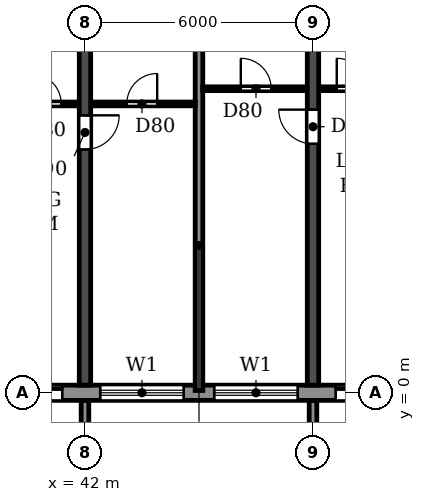
"""IFC4 building model, lengths in metres.
Left out: names, types, materials, properties, quantities, classifications, styles, units other than length and angle.
Written with IfcOpenShell. Run it as: python <this file> out.ifc"""

import sys

from ifc_helpers import new_model, si_unit, direction, frame, frame_2d, origin, place, context, subcontext, project, spatial, polyline, rectangle, outline, extrude, source, transform, mapped, element, fill, save


model = new_model("IFC4")
c1 = context("Model", 3, precision=1e-05, world=origin(), true_north=direction((0.0, 1.0)))
c2 = subcontext(c1, "Body", "Model", "MODEL_VIEW")
j1 = project(units=[si_unit("LENGTHUNIT", "METRE"), si_unit("PLANEANGLEUNIT", "RADIAN")], contexts=[c1])
p1 = place(None, origin())
s1 = spatial("IfcSite", under=j1, at=p1, CompositionType="ELEMENT")
p2 = place(p1, origin())
s2 = spatial("IfcBuilding", under=s1, at=p2, CompositionType="ELEMENT")
p3 = place(p2, frame((0.0, 0.0, 155.4)))
s3 = spatial("IfcBuildingStorey", under=s2, at=p3, CompositionType="ELEMENT", Elevation=155.4)
p4 = place(p3, frame((42.0, 0.2, 0.0), z_axis=(0.0, 0.0, 1.0), x_axis=(0.0, 1.0, 0.0)))
e1 = element("IfcWall", 1, at=p4, inside=s3, PredefinedType="SHEAR", context=c2, shape_type="SweptSolid", body=[
    extrude(rectangle(XDim=11.675, YDim=0.3, at=frame_2d((5.837, 0.0))), origin(), (0.0, 0.0, 1.0), 3.0),
])
p5 = place(p4, frame((6.2, 0.0, 0.0)))
e2 = element("IfcOpeningElement", 2, at=p5, cuts=e1, PredefinedType="OPENING", context=c2, shape_type="SweptSolid", body=[
    extrude(rectangle(XDim=0.9, YDim=2.1, at=frame_2d((0.45, 1.05))), frame((0.0, 0.16, 0.0), z_axis=(0.0, -1.0, 0.0), x_axis=(1.0, 0.0, 0.0)), (0.0, 0.0, 1.0), 0.32),
])
p6 = place(p3, frame((48.0, 0.2, 0.0), z_axis=(0.0, 0.0, 1.0), x_axis=(0.0, 1.0, 0.0)))
e3 = element("IfcWall", 3, at=p6, inside=s3, PredefinedType="SHEAR", context=c2, shape_type="SweptSolid", body=[
    extrude(rectangle(XDim=11.675, YDim=0.3, at=frame_2d((5.837, 0.0))), origin(), (0.0, 0.0, 1.0), 3.0),
])
p7 = place(p6, frame((6.35, 0.0, 0.0)))
e4 = element("IfcOpeningElement", 4, at=p7, cuts=e3, PredefinedType="OPENING", context=c2, shape_type="SweptSolid", body=[
    extrude(rectangle(XDim=0.9, YDim=2.1, at=frame_2d((0.45, 1.05))), frame((0.0, 0.16, 0.0), z_axis=(0.0, -1.0, 0.0), x_axis=(1.0, 0.0, 0.0)), (0.0, 0.0, 1.0), 0.32),
])
p8 = place(p3, frame((16.683, 0.0, 0.0), z_axis=(0.0, 0.0, 1.0), x_axis=(1.0, 0.0, 0.0)))
e5 = element("IfcWall", 5, at=p8, inside=s3, PredefinedType="STANDARD", context=c2, shape_type="SweptSolid", body=[
    extrude(rectangle(XDim=68.634, YDim=0.4, at=frame_2d((34.317, 0.0))), origin(), (0.0, 0.0, 1.0), 3.0),
])
p9 = place(p8, frame((1.717, 0.0, 0.9)))
e6 = element("IfcOpeningElement", 6, at=p9, cuts=e5, PredefinedType="OPENING", context=c2, shape_type="SweptSolid", body=[
    extrude(rectangle(XDim=2.2, YDim=1.5, at=frame_2d((1.1, 0.75))), frame((0.0, 0.21, 0.0), z_axis=(0.0, -1.0, 0.0), x_axis=(1.0, 0.0, 0.0)), (0.0, 0.0, 1.0), 0.42),
])
p10 = place(p8, frame((4.717, 0.0, 0.9)))
e7 = element("IfcOpeningElement", 7, at=p10, cuts=e5, PredefinedType="OPENING", context=c2, shape_type="SweptSolid", body=[
    extrude(rectangle(XDim=2.2, YDim=1.5, at=frame_2d((1.1, 0.75))), frame((0.0, 0.21, 0.0), z_axis=(0.0, -1.0, 0.0), x_axis=(1.0, 0.0, 0.0)), (0.0, 0.0, 1.0), 0.42),
])
p11 = place(p8, frame((7.917, 0.0, 0.0)))
e8 = element("IfcOpeningElement", 8, at=p11, cuts=e5, PredefinedType="OPENING", context=c2, shape_type="SweptSolid", body=[
    extrude(rectangle(XDim=1.8, YDim=2.4, at=frame_2d((0.9, 1.2))), frame((0.0, 0.21, 0.0), z_axis=(0.0, -1.0, 0.0), x_axis=(1.0, 0.0, 0.0)), (0.0, 0.0, 1.0), 0.42),
])
p12 = place(p8, frame((10.717, 0.0, 0.9)))
e9 = element("IfcOpeningElement", 9, at=p12, cuts=e5, PredefinedType="OPENING", context=c2, shape_type="SweptSolid", body=[
    extrude(rectangle(XDim=2.2, YDim=1.5, at=frame_2d((1.1, 0.75))), frame((0.0, 0.21, 0.0), z_axis=(0.0, -1.0, 0.0), x_axis=(1.0, 0.0, 0.0)), (0.0, 0.0, 1.0), 0.42),
])
p13 = place(p8, frame((13.717, 0.0, 0.9)))
e10 = element("IfcOpeningElement", 10, at=p13, cuts=e5, PredefinedType="OPENING", context=c2, shape_type="SweptSolid", body=[
    extrude(rectangle(XDim=2.2, YDim=1.5, at=frame_2d((1.1, 0.75))), frame((0.0, 0.21, 0.0), z_axis=(0.0, -1.0, 0.0), x_axis=(1.0, 0.0, 0.0)), (0.0, 0.0, 1.0), 0.42),
])
p14 = place(p8, frame((16.717, 0.0, 0.9)))
e11 = element("IfcOpeningElement", 11, at=p14, cuts=e5, PredefinedType="OPENING", context=c2, shape_type="SweptSolid", body=[
    extrude(rectangle(XDim=2.2, YDim=1.5, at=frame_2d((1.1, 0.75))), frame((0.0, 0.21, 0.0), z_axis=(0.0, -1.0, 0.0), x_axis=(1.0, 0.0, 0.0)), (0.0, 0.0, 1.0), 0.42),
])
p15 = place(p8, frame((19.717, 0.0, 0.9)))
e12 = element("IfcOpeningElement", 12, at=p15, cuts=e5, PredefinedType="OPENING", context=c2, shape_type="SweptSolid", body=[
    extrude(rectangle(XDim=2.2, YDim=1.5, at=frame_2d((1.1, 0.75))), frame((0.0, 0.21, 0.0), z_axis=(0.0, -1.0, 0.0), x_axis=(1.0, 0.0, 0.0)), (0.0, 0.0, 1.0), 0.42),
])
p16 = place(p8, frame((22.917, 0.0, 0.0)))
e13 = element("IfcOpeningElement", 13, at=p16, cuts=e5, PredefinedType="OPENING", context=c2, shape_type="SweptSolid", body=[
    extrude(rectangle(XDim=1.8, YDim=2.4, at=frame_2d((0.9, 1.2))), frame((0.0, 0.21, 0.0), z_axis=(0.0, -1.0, 0.0), x_axis=(1.0, 0.0, 0.0)), (0.0, 0.0, 1.0), 0.42),
])
p17 = place(p8, frame((25.717, 0.0, 0.9)))
e14 = element("IfcOpeningElement", 14, at=p17, cuts=e5, PredefinedType="OPENING", context=c2, shape_type="SweptSolid", body=[
    extrude(rectangle(XDim=2.2, YDim=1.5, at=frame_2d((1.1, 0.75))), frame((0.0, 0.21, 0.0), z_axis=(0.0, -1.0, 0.0), x_axis=(1.0, 0.0, 0.0)), (0.0, 0.0, 1.0), 0.42),
])
p18 = place(p8, frame((28.717, 0.0, 0.9)))
e15 = element("IfcOpeningElement", 15, at=p18, cuts=e5, PredefinedType="OPENING", context=c2, shape_type="SweptSolid", body=[
    extrude(rectangle(XDim=2.2, YDim=1.5, at=frame_2d((1.1, 0.75))), frame((0.0, 0.21, 0.0), z_axis=(0.0, -1.0, 0.0), x_axis=(1.0, 0.0, 0.0)), (0.0, 0.0, 1.0), 0.42),
])
p19 = place(p8, frame((31.917, 0.0, 0.0)))
e16 = element("IfcOpeningElement", 16, at=p19, cuts=e5, PredefinedType="OPENING", context=c2, shape_type="SweptSolid", body=[
    extrude(rectangle(XDim=1.8, YDim=2.4, at=frame_2d((0.9, 1.2))), frame((0.0, 0.21, 0.0), z_axis=(0.0, -1.0, 0.0), x_axis=(1.0, 0.0, 0.0)), (0.0, 0.0, 1.0), 0.42),
])
p20 = place(p8, frame((34.717, 0.0, 0.9)))
e17 = element("IfcOpeningElement", 17, at=p20, cuts=e5, PredefinedType="OPENING", context=c2, shape_type="SweptSolid", body=[
    extrude(rectangle(XDim=2.2, YDim=1.5, at=frame_2d((1.1, 0.75))), frame((0.0, 0.21, 0.0), z_axis=(0.0, -1.0, 0.0), x_axis=(1.0, 0.0, 0.0)), (0.0, 0.0, 1.0), 0.42),
])
p21 = place(p8, frame((37.717, 0.0, 0.9)))
e18 = element("IfcOpeningElement", 18, at=p21, cuts=e5, PredefinedType="OPENING", context=c2, shape_type="SweptSolid", body=[
    extrude(rectangle(XDim=2.2, YDim=1.5, at=frame_2d((1.1, 0.75))), frame((0.0, 0.21, 0.0), z_axis=(0.0, -1.0, 0.0), x_axis=(1.0, 0.0, 0.0)), (0.0, 0.0, 1.0), 0.42),
])
p22 = place(p8, frame((40.717, 0.0, 0.9)))
e19 = element("IfcOpeningElement", 19, at=p22, cuts=e5, PredefinedType="OPENING", context=c2, shape_type="SweptSolid", body=[
    extrude(rectangle(XDim=2.2, YDim=1.5, at=frame_2d((1.1, 0.75))), frame((0.0, 0.21, 0.0), z_axis=(0.0, -1.0, 0.0), x_axis=(1.0, 0.0, 0.0)), (0.0, 0.0, 1.0), 0.42),
])
p23 = place(p8, frame((43.717, 0.0, 0.9)))
e20 = element("IfcOpeningElement", 20, at=p23, cuts=e5, PredefinedType="OPENING", context=c2, shape_type="SweptSolid", body=[
    extrude(rectangle(XDim=2.2, YDim=1.5, at=frame_2d((1.1, 0.75))), frame((0.0, 0.21, 0.0), z_axis=(0.0, -1.0, 0.0), x_axis=(1.0, 0.0, 0.0)), (0.0, 0.0, 1.0), 0.42),
])
p24 = place(p8, frame((46.917, 0.0, 0.0)))
e21 = element("IfcOpeningElement", 21, at=p24, cuts=e5, PredefinedType="OPENING", context=c2, shape_type="SweptSolid", body=[
    extrude(rectangle(XDim=1.8, YDim=2.4, at=frame_2d((0.9, 1.2))), frame((0.0, 0.21, 0.0), z_axis=(0.0, -1.0, 0.0), x_axis=(1.0, 0.0, 0.0)), (0.0, 0.0, 1.0), 0.42),
])
p25 = place(p8, frame((49.717, 0.0, 0.9)))
e22 = element("IfcOpeningElement", 22, at=p25, cuts=e5, PredefinedType="OPENING", context=c2, shape_type="SweptSolid", body=[
    extrude(rectangle(XDim=2.2, YDim=1.5, at=frame_2d((1.1, 0.75))), frame((0.0, 0.21, 0.0), z_axis=(0.0, -1.0, 0.0), x_axis=(1.0, 0.0, 0.0)), (0.0, 0.0, 1.0), 0.42),
])
p26 = place(p8, frame((52.717, 0.0, 0.9)))
e23 = element("IfcOpeningElement", 23, at=p26, cuts=e5, PredefinedType="OPENING", context=c2, shape_type="SweptSolid", body=[
    extrude(rectangle(XDim=2.2, YDim=1.5, at=frame_2d((1.1, 0.75))), frame((0.0, 0.21, 0.0), z_axis=(0.0, -1.0, 0.0), x_axis=(1.0, 0.0, 0.0)), (0.0, 0.0, 1.0), 0.42),
])
p27 = place(p8, frame((55.717, 0.0, 0.9)))
e24 = element("IfcOpeningElement", 24, at=p27, cuts=e5, PredefinedType="OPENING", context=c2, shape_type="SweptSolid", body=[
    extrude(rectangle(XDim=2.2, YDim=1.5, at=frame_2d((1.1, 0.75))), frame((0.0, 0.21, 0.0), z_axis=(0.0, -1.0, 0.0), x_axis=(1.0, 0.0, 0.0)), (0.0, 0.0, 1.0), 0.42),
])
p28 = place(p8, frame((58.917, 0.0, 0.0)))
e25 = element("IfcOpeningElement", 25, at=p28, cuts=e5, PredefinedType="OPENING", context=c2, shape_type="SweptSolid", body=[
    extrude(rectangle(XDim=1.8, YDim=2.4, at=frame_2d((0.9, 1.2))), frame((0.0, 0.21, 0.0), z_axis=(0.0, -1.0, 0.0), x_axis=(1.0, 0.0, 0.0)), (0.0, 0.0, 1.0), 0.42),
])
p29 = place(p8, frame((61.717, 0.0, 0.9)))
e26 = element("IfcOpeningElement", 26, at=p29, cuts=e5, PredefinedType="OPENING", context=c2, shape_type="SweptSolid", body=[
    extrude(rectangle(XDim=2.2, YDim=1.5, at=frame_2d((1.1, 0.75))), frame((0.0, 0.21, 0.0), z_axis=(0.0, -1.0, 0.0), x_axis=(1.0, 0.0, 0.0)), (0.0, 0.0, 1.0), 0.42),
])
p30 = place(p8, frame((64.717, 0.0, 0.9)))
e27 = element("IfcOpeningElement", 27, at=p30, cuts=e5, PredefinedType="OPENING", context=c2, shape_type="SweptSolid", body=[
    extrude(rectangle(XDim=2.2, YDim=1.5, at=frame_2d((1.1, 0.75))), frame((0.0, 0.21, 0.0), z_axis=(0.0, -1.0, 0.0), x_axis=(1.0, 0.0, 0.0)), (0.0, 0.0, 1.0), 0.42),
])
m1 = source(origin(), c2, "Body", "SweptSolid", [
    extrude(outline(polyline([(0.0, 0.0), (0.2, 0.0), (0.2, 1.65), (0.0, 1.65), (0.0, 0.0)])), origin(), (0.0, 0.0, 1.0), 3.1),
])
for number, where in (
    (28, (41.9, -1.85, 0.0)),
    (29, (47.9, -1.85, 0.0)),
):
    element("IfcWall", number, at=place(p3, frame(where)), inside=s3, PredefinedType="STANDARD", context=c2, shape_type="MappedRepresentation", body=[
        mapped(m1, transform((0.0, 0.0, 0.0))),
    ])
p31 = place(p3, frame((45.0, 0.06, 0.0), z_axis=(0.0, 0.0, 1.0), x_axis=(0.0, 1.0, 0.0)))
e30 = element("IfcWall", 30, at=p31, inside=s3, PredefinedType="PARTITIONING", context=c2, shape_type="SweptSolid", body=[
    extrude(rectangle(XDim=11.805, YDim=0.2, at=frame_2d((5.902, 0.0))), origin(), (0.0, 0.0, 1.0), 3.0),
])
p32 = place(p3, frame((39.9, 7.6, 0.0), z_axis=(0.0, 0.0, 1.0), x_axis=(1.0, 0.0, 0.0)))
e31 = element("IfcWall", 31, at=p32, inside=s3, PredefinedType="PARTITIONING", context=c2, shape_type="SweptSolid", body=[
    extrude(rectangle(XDim=1.94, YDim=0.1, at=frame_2d((0.97, 0.0))), origin(), (0.0, 0.0, 1.0), 3.0),
])
p33 = place(p32, frame((0.675, 0.0, 0.0)))
e32 = element("IfcOpeningElement", 32, at=p33, cuts=e31, PredefinedType="OPENING", context=c2, shape_type="SweptSolid", body=[
    extrude(rectangle(XDim=0.8, YDim=2.1, at=frame_2d((0.4, 1.05))), frame((0.0, 0.06, 0.0), z_axis=(0.0, -1.0, 0.0), x_axis=(1.0, 0.0, 0.0)), (0.0, 0.0, 1.0), 0.12),
])
p34 = place(p3, frame((42.16, 7.6, 0.0), z_axis=(0.0, 0.0, 1.0), x_axis=(1.0, 0.0, 0.0)))
e33 = element("IfcWall", 33, at=p34, inside=s3, PredefinedType="PARTITIONING", context=c2, shape_type="SweptSolid", body=[
    extrude(rectangle(XDim=2.74, YDim=0.1, at=frame_2d((1.37, 0.0))), origin(), (0.0, 0.0, 1.0), 3.0),
])
p35 = place(p34, frame((0.94, 0.0, 0.0)))
e34 = element("IfcOpeningElement", 34, at=p35, cuts=e33, PredefinedType="OPENING", context=c2, shape_type="SweptSolid", body=[
    extrude(rectangle(XDim=0.8, YDim=2.1, at=frame_2d((0.4, 1.05))), frame((0.0, 0.06, 0.0), z_axis=(0.0, -1.0, 0.0), x_axis=(1.0, 0.0, 0.0)), (0.0, 0.0, 1.0), 0.12),
])
p36 = place(p3, frame((45.1, 8.0, 0.0), z_axis=(0.0, 0.0, 1.0), x_axis=(1.0, 0.0, 0.0)))
e35 = element("IfcWall", 35, at=p36, inside=s3, PredefinedType="PARTITIONING", context=c2, shape_type="SweptSolid", body=[
    extrude(rectangle(XDim=2.74, YDim=0.1, at=frame_2d((1.37, 0.0))), origin(), (0.0, 0.0, 1.0), 3.0),
])
p37 = place(p36, frame((1.0, 0.0, 0.0)))
e36 = element("IfcOpeningElement", 36, at=p37, cuts=e35, PredefinedType="OPENING", context=c2, shape_type="SweptSolid", body=[
    extrude(rectangle(XDim=0.8, YDim=2.1, at=frame_2d((0.4, 1.05))), frame((0.0, 0.06, 0.0), z_axis=(0.0, -1.0, 0.0), x_axis=(1.0, 0.0, 0.0)), (0.0, 0.0, 1.0), 0.12),
])
p38 = place(p3, frame((48.16, 8.0, 0.0), z_axis=(0.0, 0.0, 1.0), x_axis=(1.0, 0.0, 0.0)))
e37 = element("IfcWall", 37, at=p38, inside=s3, PredefinedType="PARTITIONING", context=c2, shape_type="SweptSolid", body=[
    extrude(rectangle(XDim=1.94, YDim=0.1, at=frame_2d((0.97, 0.0))), origin(), (0.0, 0.0, 1.0), 3.0),
])
p39 = place(p38, frame((0.465, 0.0, 0.0)))
e38 = element("IfcOpeningElement", 38, at=p39, cuts=e37, PredefinedType="OPENING", context=c2, shape_type="SweptSolid", body=[
    extrude(rectangle(XDim=0.8, YDim=2.1, at=frame_2d((0.4, 1.05))), frame((0.0, 0.06, 0.0), z_axis=(0.0, -1.0, 0.0), x_axis=(1.0, 0.0, 0.0)), (0.0, 0.0, 1.0), 0.12),
])
p40 = place(p16, origin())
e39 = element("IfcDoor", 39, at=p40, inside=s3, OperationType="DOUBLE_DOOR_SLIDING", PredefinedType="DOOR", context=c2, shape_type="SweptSolid", body=[
    extrude(rectangle(XDim=1.8, YDim=2.4, at=frame_2d((0.9, 1.2))), frame((0.0, 0.025, 0.0), z_axis=(0.0, -1.0, 0.0), x_axis=(1.0, 0.0, 0.0)), (0.0, 0.0, 1.0), 0.05),
])
fill(e13, e39)
p41 = place(p17, origin())
e40 = element("IfcWindow", 40, at=p41, inside=s3, PartitioningType="DOUBLE_PANEL_HORIZONTAL", PredefinedType="WINDOW", context=c2, shape_type="SweptSolid", body=[
    extrude(rectangle(XDim=2.2, YDim=1.5, at=frame_2d((1.1, 0.75))), frame((0.0, 0.03, 0.0), z_axis=(0.0, -1.0, 0.0), x_axis=(1.0, 0.0, 0.0)), (0.0, 0.0, 1.0), 0.06),
])
fill(e14, e40)
p42 = place(p18, origin())
e41 = element("IfcWindow", 41, at=p42, inside=s3, PartitioningType="DOUBLE_PANEL_HORIZONTAL", PredefinedType="WINDOW", context=c2, shape_type="SweptSolid", body=[
    extrude(rectangle(XDim=2.2, YDim=1.5, at=frame_2d((1.1, 0.75))), frame((0.0, 0.03, 0.0), z_axis=(0.0, -1.0, 0.0), x_axis=(1.0, 0.0, 0.0)), (0.0, 0.0, 1.0), 0.06),
])
fill(e15, e41)
p43 = place(p19, origin())
e42 = element("IfcDoor", 42, at=p43, inside=s3, OperationType="DOUBLE_DOOR_SLIDING", PredefinedType="DOOR", context=c2, shape_type="SweptSolid", body=[
    extrude(rectangle(XDim=1.8, YDim=2.4, at=frame_2d((0.9, 1.2))), frame((0.0, 0.025, 0.0), z_axis=(0.0, -1.0, 0.0), x_axis=(1.0, 0.0, 0.0)), (0.0, 0.0, 1.0), 0.05),
])
fill(e16, e42)
p44 = place(p35, origin())
e43 = element("IfcDoor", 43, at=p44, inside=s3, OperationType="SINGLE_SWING_RIGHT", PredefinedType="DOOR", context=c2, shape_type="SweptSolid", body=[
    extrude(rectangle(XDim=0.8, YDim=2.1, at=frame_2d((0.4, 1.05))), frame((0.0, 0.025, 0.0), z_axis=(0.0, -1.0, 0.0), x_axis=(1.0, 0.0, 0.0)), (0.0, 0.0, 1.0), 0.05),
])
fill(e34, e43)
p45 = place(p33, origin())
e44 = element("IfcDoor", 44, at=p45, inside=s3, OperationType="SINGLE_SWING_LEFT", PredefinedType="DOOR", context=c2, shape_type="SweptSolid", body=[
    extrude(rectangle(XDim=0.8, YDim=2.1, at=frame_2d((0.4, 1.05))), frame((0.0, 0.025, 0.0), z_axis=(0.0, -1.0, 0.0), x_axis=(1.0, 0.0, 0.0)), (0.0, 0.0, 1.0), 0.05),
])
fill(e32, e44)
p46 = place(p5, frame((0.9, 0.0, 0.0), z_axis=(0.0, 0.0, 1.0), x_axis=(-1.0, 0.0, 0.0)))
e45 = element("IfcDoor", 45, at=p46, inside=s3, OperationType="SINGLE_SWING_LEFT", PredefinedType="DOOR", context=c2, shape_type="SweptSolid", body=[
    extrude(rectangle(XDim=0.9, YDim=2.1, at=frame_2d((0.45, 1.05))), frame((0.0, 0.025, 0.0), z_axis=(0.0, -1.0, 0.0), x_axis=(1.0, 0.0, 0.0)), (0.0, 0.0, 1.0), 0.05),
])
fill(e2, e45)
p47 = place(p37, origin())
e46 = element("IfcDoor", 46, at=p47, inside=s3, OperationType="SINGLE_SWING_LEFT", PredefinedType="DOOR", context=c2, shape_type="SweptSolid", body=[
    extrude(rectangle(XDim=0.8, YDim=2.1, at=frame_2d((0.4, 1.05))), frame((0.0, 0.025, 0.0), z_axis=(0.0, -1.0, 0.0), x_axis=(1.0, 0.0, 0.0)), (0.0, 0.0, 1.0), 0.05),
])
fill(e36, e46)
p48 = place(p7, origin())
e47 = element("IfcDoor", 47, at=p48, inside=s3, OperationType="SINGLE_SWING_RIGHT", PredefinedType="DOOR", context=c2, shape_type="SweptSolid", body=[
    extrude(rectangle(XDim=0.9, YDim=2.1, at=frame_2d((0.45, 1.05))), frame((0.0, 0.025, 0.0), z_axis=(0.0, -1.0, 0.0), x_axis=(1.0, 0.0, 0.0)), (0.0, 0.0, 1.0), 0.05),
])
fill(e4, e47)
p49 = place(p39, origin())
e48 = element("IfcDoor", 48, at=p49, inside=s3, OperationType="SINGLE_SWING_LEFT", PredefinedType="DOOR", context=c2, shape_type="SweptSolid", body=[
    extrude(rectangle(XDim=0.8, YDim=2.1, at=frame_2d((0.4, 1.05))), frame((0.0, 0.025, 0.0), z_axis=(0.0, -1.0, 0.0), x_axis=(1.0, 0.0, 0.0)), (0.0, 0.0, 1.0), 0.05),
])
fill(e38, e48)
save(model, sys.argv[1])
